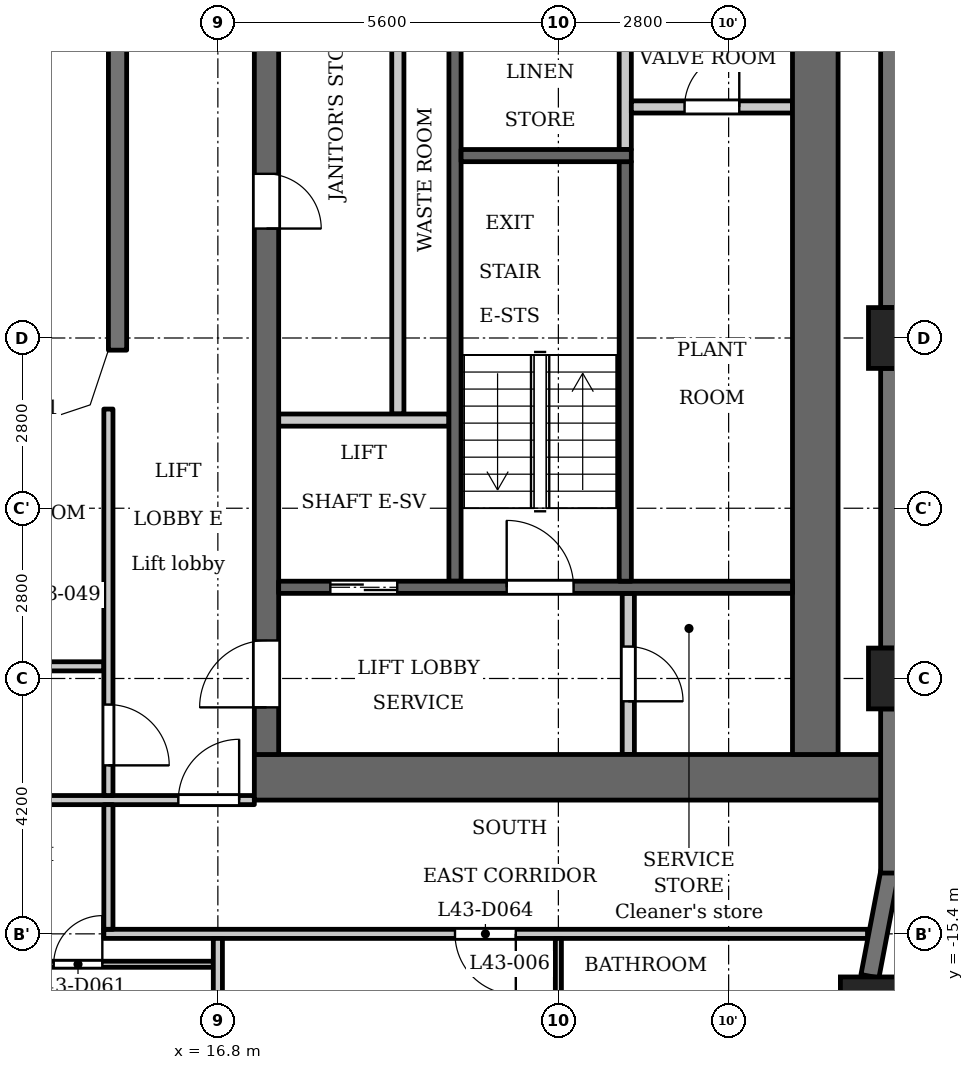
"""IFC4 building model, lengths in metres.
Left out: names, types, materials, properties, quantities, classifications, styles, units other than length and angle.
Written with IfcOpenShell. Run it as: python <this file> out.ifc"""

import sys

from ifc_helpers import new_model, si_unit, direction, frame, frame_2d, origin, origin_2d, place, context, subcontext, project, spatial, polyline, rectangle, outline, extrude, element, fill, save


model = new_model("IFC4")
c1 = context("Model", 3, precision=1e-05, world=origin(), true_north=direction((0.0, 1.0)))
c2 = subcontext(c1, "Body", "Model", "MODEL_VIEW")
j1 = project(units=[si_unit("LENGTHUNIT", "METRE"), si_unit("PLANEANGLEUNIT", "RADIAN")], contexts=[c1])
p1 = place(None, origin())
s1 = spatial("IfcSite", under=j1, at=p1, CompositionType="ELEMENT")
p2 = place(p1, origin())
s2 = spatial("IfcBuilding", under=s1, at=p2, CompositionType="ELEMENT")
p3 = place(p2, frame((0.0, 0.0, 167.6)))
s3 = spatial("IfcBuildingStorey", under=s2, at=p3, CompositionType="ELEMENT", Elevation=167.6)
for number, where, z_axis, x_axis in (
    (1, (27.538, -16.609, 0.0), (0.0, 0.0, 1.0), (1.0, 0.0, 0.0)),
    (2, (28.0, -11.2, 0.0), (0.0, 0.0, 1.0), (1.0, 0.0, 0.0)),
    (3, (28.0, -5.6, 0.0), (0.0, 0.0, 1.0), (1.0, 0.0, 0.0)),
):
    element("IfcColumn", number, at=place(p3, frame(where, z_axis=z_axis, x_axis=x_axis)), inside=s3, PredefinedType="COLUMN", context=c2, shape_type="SweptSolid", body=[
        extrude(rectangle(XDim=1.0, YDim=1.0, at=origin_2d()), origin(), (0.0, 0.0, 1.0), 3.5),
    ])
p4 = place(p3, frame((27.524, -16.097, 0.0), z_axis=(0.0, 0.0, 1.0), x_axis=(0.187259034321, 0.982310569049, 0.0)))
e4 = element("IfcWall", 4, at=p4, inside=s3, PredefinedType="SOLIDWALL", context=c2, shape_type="SweptSolid", body=[
    extrude(rectangle(XDim=1.756, YDim=0.3, at=frame_2d((0.878, 0.0))), origin(), (0.0, 0.0, 1.0), 2.45),
])
p5 = place(p3, frame((27.85, -14.4, 0.0), z_axis=(0.0, 0.0, 1.0), x_axis=(0.0, 1.0, 0.0)))
e5 = element("IfcWall", 5, at=p5, inside=s3, PredefinedType="SOLIDWALL", context=c2, shape_type="SweptSolid", body=[
    extrude(rectangle(XDim=2.7, YDim=0.3, at=frame_2d((1.35, 0.0))), origin(), (0.0, 0.0, 1.0), 2.45),
])
p6 = place(p3, frame((27.85, -10.7, 0.0), z_axis=(0.0, 0.0, 1.0), x_axis=(0.0, 1.0, 0.0)))
e6 = element("IfcWall", 6, at=p6, inside=s3, PredefinedType="SOLIDWALL", context=c2, shape_type="SweptSolid", body=[
    extrude(rectangle(XDim=4.6, YDim=0.3, at=frame_2d((2.3, 0.0))), origin(), (0.0, 0.0, 1.0), 2.45),
])
p7 = place(p3, frame((27.85, -5.1, 0.0), z_axis=(0.0, 0.0, 1.0), x_axis=(0.0, 1.0, 0.0)))
e7 = element("IfcWall", 7, at=p7, inside=s3, PredefinedType="SOLIDWALL", context=c2, shape_type="SweptSolid", body=[
    extrude(rectangle(XDim=4.6, YDim=0.3, at=frame_2d((2.3, 0.0))), origin(), (0.0, 0.0, 1.0), 2.45),
])
p8 = place(p3, frame((15.15, 5.8, 0.0), z_axis=(0.0, 0.0, 1.0), x_axis=(0.0, -1.0, 0.0)))
e8 = element("IfcWall", 8, at=p8, inside=s3, PredefinedType="SOLIDWALL", context=c2, shape_type="SweptSolid", body=[
    extrude(rectangle(XDim=11.6, YDim=0.3, at=frame_2d((5.8, 0.0))), origin(), (0.0, 0.0, 1.0), 3.2),
])
p9 = place(p3, frame((23.5, -2.5, 0.0), z_axis=(0.0, 0.0, 1.0), x_axis=(0.0, 1.0, 0.0)))
e9 = element("IfcWall", 9, at=p9, inside=s3, PredefinedType="PARTITIONING", context=c2, shape_type="SweptSolid", body=[
    extrude(rectangle(XDim=2.65, YDim=0.2, at=frame_2d((1.325, 0.0))), origin(), (0.0, 0.0, 1.0), 3.2),
])
p10 = place(p3, frame((20.7, -9.6, 0.0), z_axis=(0.0, 0.0, 1.0), x_axis=(0.0, 1.0, 0.0)))
e10 = element("IfcWall", 10, at=p10, inside=s3, PredefinedType="SHEAR", context=c2, shape_type="SweptSolid", body=[
    extrude(rectangle(XDim=9.75, YDim=0.2, at=frame_2d((4.875, 0.0))), origin(), (0.0, 0.0, 1.0), 3.2),
])
p11 = place(p3, frame((17.4, -12.825, 0.0), z_axis=(0.0, 0.0, 1.0), x_axis=(1.0, 0.0, 0.0)))
e11 = element("IfcWall", 11, at=p11, inside=s3, PredefinedType="SHEAR", context=c2, shape_type="SweptSolid", body=[
    extrude(rectangle(XDim=10.4, YDim=0.75, at=frame_2d((5.2, 0.0))), origin(), (0.0, 0.0, 1.0), 3.2),
])
p12 = place(p3, frame((19.76, -6.85, 0.0), z_axis=(0.0, 0.0, 1.0), x_axis=(0.0, 1.0, 0.0)))
e12 = element("IfcWall", 12, at=p12, inside=s3, PredefinedType="PARTITIONING", context=c2, shape_type="SweptSolid", body=[
    extrude(rectangle(XDim=7.0, YDim=0.2, at=frame_2d((3.5, 0.0))), origin(), (0.0, 0.0, 1.0), 3.2),
])
p13 = place(p3, frame((17.6, -12.45, 0.0), z_axis=(0.0, 0.0, 1.0), x_axis=(0.0, 1.0, 0.0)))
e13 = element("IfcWall", 13, at=p13, inside=s3, PredefinedType="SHEAR", context=c2, shape_type="SweptSolid", body=[
    extrude(rectangle(XDim=24.9, YDim=0.4, at=frame_2d((12.45, 0.0))), origin(), (0.0, 0.0, 1.0), 3.2),
])
p14 = place(p13, frame((8.65, 0.0, 0.0)))
e14 = element("IfcOpeningElement", 14, at=p14, cuts=e13, PredefinedType="OPENING", context=c2, shape_type="SweptSolid", body=[
    extrude(rectangle(XDim=0.9, YDim=2.1, at=frame_2d((0.45, 1.05))), frame((0.0, 0.21, 0.0), z_axis=(0.0, -1.0, 0.0), x_axis=(1.0, 0.0, 0.0)), (0.0, 0.0, 1.0), 0.42),
])
p15 = place(p13, frame((15.6, 0.0, 0.0)))
e15 = element("IfcOpeningElement", 15, at=p15, cuts=e13, PredefinedType="OPENING", context=c2, shape_type="SweptSolid", body=[
    extrude(rectangle(XDim=1.1, YDim=2.1, at=frame_2d((0.55, 1.05))), frame((0.0, 0.21, 0.0), z_axis=(0.0, -1.0, 0.0), x_axis=(1.0, 0.0, 0.0)), (0.0, 0.0, 1.0), 0.42),
])
p16 = place(p13, frame((18.0, 0.0, 0.0)))
e16 = element("IfcOpeningElement", 16, at=p16, cuts=e13, PredefinedType="OPENING", context=c2, shape_type="SweptSolid", body=[
    extrude(rectangle(XDim=1.1, YDim=2.1, at=frame_2d((0.55, 1.05))), frame((0.0, 0.21, 0.0), z_axis=(0.0, -1.0, 0.0), x_axis=(1.0, 0.0, 0.0)), (0.0, 0.0, 1.0), 0.42),
])
p17 = place(p13, frame((23.025, 0.0, 0.0)))
e17 = element("IfcOpeningElement", 17, at=p17, cuts=e13, PredefinedType="OPENING", context=c2, shape_type="SweptSolid", body=[
    extrude(rectangle(XDim=1.1, YDim=2.1, at=frame_2d((0.55, 1.05))), frame((0.0, 0.21, 0.0), z_axis=(0.0, -1.0, 0.0), x_axis=(1.0, 0.0, 0.0)), (0.0, 0.0, 1.0), 0.42),
])
p18 = place(p13, frame((0.775, 0.0, 0.0)))
e18 = element("IfcOpeningElement", 18, at=p18, cuts=e13, PredefinedType="OPENING", context=c2, shape_type="SweptSolid", body=[
    extrude(rectangle(XDim=1.1, YDim=2.1, at=frame_2d((0.55, 1.05))), frame((0.0, 0.21, 0.0), z_axis=(0.0, -1.0, 0.0), x_axis=(1.0, 0.0, 0.0)), (0.0, 0.0, 1.0), 0.42),
])
p19 = place(p13, frame((12.925, 0.0, 0.0)))
e19 = element("IfcOpeningElement", 19, at=p19, cuts=e13, PredefinedType="OPENING", context=c2, shape_type="SweptSolid", body=[
    extrude(rectangle(XDim=1.8, YDim=2.1, at=frame_2d((0.9, 1.05))), frame((0.0, 0.21, 0.0), z_axis=(0.0, -1.0, 0.0), x_axis=(1.0, 0.0, 0.0)), (0.0, 0.0, 1.0), 0.42),
])
p20 = place(p3, frame((26.625, -12.45, 0.0), z_axis=(0.0, 0.0, 1.0), x_axis=(0.0, 1.0, 0.0)))
e20 = element("IfcWall", 20, at=p20, inside=s3, PredefinedType="SHEAR", context=c2, shape_type="SweptSolid", body=[
    extrude(rectangle(XDim=24.9, YDim=0.75, at=frame_2d((12.45, 0.0))), origin(), (0.0, 0.0, 1.0), 3.2),
])
p21 = place(p3, frame((23.55, -12.45, 0.0), z_axis=(0.0, 0.0, 1.0), x_axis=(0.0, 1.0, 0.0)))
e21 = element("IfcWall", 21, at=p21, inside=s3, PredefinedType="PARTITIONING", context=c2, shape_type="SweptSolid", body=[
    extrude(rectangle(XDim=2.65, YDim=0.2, at=frame_2d((1.325, 0.0))), origin(), (0.0, 0.0, 1.0), 3.2),
])
p22 = place(p21, frame((0.875, 0.0, 0.0)))
e22 = element("IfcOpeningElement", 22, at=p22, cuts=e21, PredefinedType="OPENING", context=c2, shape_type="SweptSolid", body=[
    extrude(rectangle(XDim=0.9, YDim=2.1, at=frame_2d((0.45, 1.05))), frame((0.0, 0.11, 0.0), z_axis=(0.0, -1.0, 0.0), x_axis=(1.0, 0.0, 0.0)), (0.0, 0.0, 1.0), 0.22),
])
p23 = place(p3, frame((23.6, -1.8, 0.0), z_axis=(0.0, 0.0, 1.0), x_axis=(1.0, 0.0, 0.0)))
e23 = element("IfcWall", 23, at=p23, inside=s3, PredefinedType="PARTITIONING", context=c2, shape_type="SweptSolid", body=[
    extrude(rectangle(XDim=2.65, YDim=0.2, at=frame_2d((1.325, 0.0))), origin(), (0.0, 0.0, 1.0), 3.2),
])
p24 = place(p23, frame((0.875, 0.0, 0.0)))
e24 = element("IfcOpeningElement", 24, at=p24, cuts=e23, PredefinedType="OPENING", context=c2, shape_type="SweptSolid", body=[
    extrude(rectangle(XDim=0.9, YDim=2.1, at=frame_2d((0.45, 1.05))), frame((0.0, 0.11, 0.0), z_axis=(0.0, -1.0, 0.0), x_axis=(1.0, 0.0, 0.0)), (0.0, 0.0, 1.0), 0.22),
])
p25 = place(p3, frame((17.8, -9.7, 0.0), z_axis=(0.0, 0.0, 1.0), x_axis=(1.0, 0.0, 0.0)))
e25 = element("IfcWall", 25, at=p25, inside=s3, PredefinedType="SHEAR", context=c2, shape_type="SweptSolid", body=[
    extrude(rectangle(XDim=8.45, YDim=0.2, at=frame_2d((4.225, 0.0))), origin(), (0.0, 0.0, 1.0), 3.2),
])
p26 = place(p25, frame((0.85, 0.0, 0.0)))
e26 = element("IfcOpeningElement", 26, at=p26, cuts=e25, PredefinedType="OPENING", context=c2, shape_type="SweptSolid", body=[
    extrude(rectangle(XDim=1.1, YDim=2.1, at=frame_2d((0.55, 1.05))), frame((0.0, 0.11, 0.0), z_axis=(0.0, -1.0, 0.0), x_axis=(1.0, 0.0, 0.0)), (0.0, 0.0, 1.0), 0.22),
])
p27 = place(p25, frame((3.75, 0.0, 0.0)))
e27 = element("IfcOpeningElement", 27, at=p27, cuts=e25, PredefinedType="OPENING", context=c2, shape_type="SweptSolid", body=[
    extrude(rectangle(XDim=1.1, YDim=2.1, at=frame_2d((0.55, 1.05))), frame((0.0, 0.11, 0.0), z_axis=(0.0, -1.0, 0.0), x_axis=(1.0, 0.0, 0.0)), (0.0, 0.0, 1.0), 0.22),
])
p28 = place(p3, frame((17.8, -6.95, 0.0), z_axis=(0.0, 0.0, 1.0), x_axis=(1.0, 0.0, 0.0)))
e28 = element("IfcWall", 28, at=p28, inside=s3, PredefinedType="PARTITIONING", context=c2, shape_type="SweptSolid", body=[
    extrude(rectangle(XDim=2.8, YDim=0.2, at=frame_2d((1.4, 0.0))), origin(), (0.0, 0.0, 1.0), 3.2),
])
p29 = place(p3, frame((23.5, -9.6, 0.0), z_axis=(0.0, 0.0, 1.0), x_axis=(0.0, 1.0, 0.0)))
e29 = element("IfcWall", 29, at=p29, inside=s3, PredefinedType="SHEAR", context=c2, shape_type="SweptSolid", body=[
    extrude(rectangle(XDim=6.9, YDim=0.2, at=frame_2d((3.45, 0.0))), origin(), (0.0, 0.0, 1.0), 3.2),
])
p30 = place(p3, frame((20.8, -2.6, 0.0), z_axis=(0.0, 0.0, 1.0), x_axis=(1.0, 0.0, 0.0)))
e30 = element("IfcWall", 30, at=p30, inside=s3, PredefinedType="SHEAR", context=c2, shape_type="SweptSolid", body=[
    extrude(rectangle(XDim=2.8, YDim=0.2, at=frame_2d((1.4, 0.0))), origin(), (0.0, 0.0, 1.0), 3.2),
])
p31 = place(p3, frame((-16.725, -15.9, 0.0), z_axis=(0.0, 0.0, 1.0), x_axis=(1.0, 0.0, 0.0)))
e31 = element("IfcWall", 31, at=p31, inside=s3, PredefinedType="PARTITIONING", context=c2, shape_type="SweptSolid", body=[
    extrude(rectangle(XDim=33.45, YDim=0.1, at=frame_2d((16.725, 0.0))), origin(), (0.0, 0.0, 1.0), 3.2),
])
p32 = place(p31, frame((9.675, 0.0, 0.0)))
e32 = element("IfcOpeningElement", 32, at=p32, cuts=e31, PredefinedType="OPENING", context=c2, shape_type="SweptSolid", body=[
    extrude(rectangle(XDim=0.8, YDim=2.1, at=frame_2d((0.4, 1.05))), frame((0.0, 0.06, 0.0), z_axis=(0.0, -1.0, 0.0), x_axis=(1.0, 0.0, 0.0)), (0.0, 0.0, 1.0), 0.12),
])
p33 = place(p31, frame((4.075, 0.0, 0.0)))
e33 = element("IfcOpeningElement", 33, at=p33, cuts=e31, PredefinedType="OPENING", context=c2, shape_type="SweptSolid", body=[
    extrude(rectangle(XDim=0.9, YDim=2.1, at=frame_2d((0.45, 1.05))), frame((0.0, 0.06, 0.0), z_axis=(0.0, -1.0, 0.0), x_axis=(1.0, 0.0, 0.0)), (0.0, 0.0, 1.0), 0.12),
])
p34 = place(p31, frame((20.875, 0.0, 0.0)))
e34 = element("IfcOpeningElement", 34, at=p34, cuts=e31, PredefinedType="OPENING", context=c2, shape_type="SweptSolid", body=[
    extrude(rectangle(XDim=0.8, YDim=2.1, at=frame_2d((0.4, 1.05))), frame((0.0, 0.06, 0.0), z_axis=(0.0, -1.0, 0.0), x_axis=(1.0, 0.0, 0.0)), (0.0, 0.0, 1.0), 0.12),
])
p35 = place(p31, frame((15.275, 0.0, 0.0)))
e35 = element("IfcOpeningElement", 35, at=p35, cuts=e31, PredefinedType="OPENING", context=c2, shape_type="SweptSolid", body=[
    extrude(rectangle(XDim=0.9, YDim=2.1, at=frame_2d((0.45, 1.05))), frame((0.0, 0.06, 0.0), z_axis=(0.0, -1.0, 0.0), x_axis=(1.0, 0.0, 0.0)), (0.0, 0.0, 1.0), 0.12),
])
p36 = place(p31, frame((30.825, 0.0, 0.0)))
e36 = element("IfcOpeningElement", 36, at=p36, cuts=e31, PredefinedType="OPENING", context=c2, shape_type="SweptSolid", body=[
    extrude(rectangle(XDim=0.8, YDim=2.1, at=frame_2d((0.4, 1.05))), frame((0.0, 0.06, 0.0), z_axis=(0.0, -1.0, 0.0), x_axis=(1.0, 0.0, 0.0)), (0.0, 0.0, 1.0), 0.12),
])
p37 = place(p31, frame((26.475, 0.0, 0.0)))
e37 = element("IfcOpeningElement", 37, at=p37, cuts=e31, PredefinedType="OPENING", context=c2, shape_type="SweptSolid", body=[
    extrude(rectangle(XDim=0.9, YDim=2.1, at=frame_2d((0.45, 1.05))), frame((0.0, 0.06, 0.0), z_axis=(0.0, -1.0, 0.0), x_axis=(1.0, 0.0, 0.0)), (0.0, 0.0, 1.0), 0.12),
])
p38 = place(p3, frame((14.925, -15.4, 0.0), z_axis=(0.0, 0.0, 1.0), x_axis=(1.0, 0.0, 0.0)))
e38 = element("IfcWall", 38, at=p38, inside=s3, PredefinedType="PARTITIONING", context=c2, shape_type="SweptSolid", body=[
    extrude(rectangle(XDim=12.559, YDim=0.15, at=frame_2d((6.279, 0.0))), origin(), (0.0, 0.0, 1.0), 3.2),
])
p39 = place(p38, frame((5.775, 0.0, 0.0)))
e39 = element("IfcOpeningElement", 39, at=p39, cuts=e38, PredefinedType="OPENING", context=c2, shape_type="SweptSolid", body=[
    extrude(rectangle(XDim=1.0, YDim=2.1, at=frame_2d((0.5, 1.05))), frame((0.0, 0.085, 0.0), z_axis=(0.0, -1.0, 0.0), x_axis=(1.0, 0.0, 0.0)), (0.0, 0.0, 1.0), 0.17),
])
p40 = place(p3, frame((-17.4, -13.2, 0.0), z_axis=(0.0, 0.0, 1.0), x_axis=(1.0, 0.0, 0.0)))
e40 = element("IfcWall", 40, at=p40, inside=s3, PredefinedType="PARTITIONING", context=c2, shape_type="SweptSolid", body=[
    extrude(rectangle(XDim=34.8, YDim=0.15, at=frame_2d((17.4, 0.0))), origin(), (0.0, 0.0, 1.0), 3.2),
])
p41 = place(p40, frame((0.15, 0.0, 0.0)))
e41 = element("IfcOpeningElement", 41, at=p41, cuts=e40, PredefinedType="OPENING", context=c2, shape_type="SweptSolid", body=[
    extrude(rectangle(XDim=1.0, YDim=2.1, at=frame_2d((0.5, 1.05))), frame((0.0, 0.085, 0.0), z_axis=(0.0, -1.0, 0.0), x_axis=(1.0, 0.0, 0.0)), (0.0, 0.0, 1.0), 0.17),
])
p42 = place(p40, frame((33.55, 0.0, 0.0)))
e42 = element("IfcOpeningElement", 42, at=p42, cuts=e40, PredefinedType="OPENING", context=c2, shape_type="SweptSolid", body=[
    extrude(rectangle(XDim=1.0, YDim=2.1, at=frame_2d((0.5, 1.05))), frame((0.0, 0.085, 0.0), z_axis=(0.0, -1.0, 0.0), x_axis=(1.0, 0.0, 0.0)), (0.0, 0.0, 1.0), 0.17),
])
p43 = place(p40, frame((15.7, 0.0, 0.0)))
e43 = element("IfcOpeningElement", 43, at=p43, cuts=e40, PredefinedType="OPENING", context=c2, shape_type="SweptSolid", body=[
    extrude(rectangle(XDim=1.0, YDim=2.1, at=frame_2d((0.5, 1.05))), frame((0.0, 0.085, 0.0), z_axis=(0.0, -1.0, 0.0), x_axis=(1.0, 0.0, 0.0)), (0.0, 0.0, 1.0), 0.17),
])
p44 = place(p40, frame((26.9, 0.0, 0.0)))
e44 = element("IfcOpeningElement", 44, at=p44, cuts=e40, PredefinedType="OPENING", context=c2, shape_type="SweptSolid", body=[
    extrude(rectangle(XDim=1.0, YDim=2.1, at=frame_2d((0.5, 1.05))), frame((0.0, 0.085, 0.0), z_axis=(0.0, -1.0, 0.0), x_axis=(1.0, 0.0, 0.0)), (0.0, 0.0, 1.0), 0.17),
])
p45 = place(p3, frame((-14.925, -11.0, 0.0), z_axis=(0.0, 0.0, 1.0), x_axis=(1.0, 0.0, 0.0)))
e45 = element("IfcWall", 45, at=p45, inside=s3, PredefinedType="PARTITIONING", context=c2, shape_type="SweptSolid", body=[
    extrude(rectangle(XDim=29.85, YDim=0.15, at=frame_2d((14.925, 0.0))), origin(), (0.0, 0.0, 1.0), 3.2),
])
p46 = place(p45, frame((9.875, 0.0, 0.0)))
e46 = element("IfcOpeningElement", 46, at=p46, cuts=e45, PredefinedType="OPENING", context=c2, shape_type="SweptSolid", body=[
    extrude(rectangle(XDim=1.0, YDim=2.1, at=frame_2d((0.5, 1.05))), frame((0.0, 0.085, 0.0), z_axis=(0.0, -1.0, 0.0), x_axis=(1.0, 0.0, 0.0)), (0.0, 0.0, 1.0), 0.17),
])
p47 = place(p45, frame((17.875, 0.0, 0.0)))
e47 = element("IfcOpeningElement", 47, at=p47, cuts=e45, PredefinedType="OPENING", context=c2, shape_type="SweptSolid", body=[
    extrude(rectangle(XDim=1.0, YDim=2.1, at=frame_2d((0.5, 1.05))), frame((0.0, 0.085, 0.0), z_axis=(0.0, -1.0, 0.0), x_axis=(1.0, 0.0, 0.0)), (0.0, 0.0, 1.0), 0.17),
])
p48 = place(p3, frame((15.0, -15.325, 0.0), z_axis=(0.0, 0.0, 1.0), x_axis=(0.0, 1.0, 0.0)))
e48 = element("IfcWall", 48, at=p48, inside=s3, PredefinedType="PARTITIONING", context=c2, shape_type="SweptSolid", body=[
    extrude(rectangle(XDim=2.05, YDim=0.15, at=frame_2d((1.025, 0.0))), origin(), (0.0, 0.0, 1.0), 3.2),
])
p49 = place(p3, frame((15.0, -13.125, 0.0), z_axis=(0.0, 0.0, 1.0), x_axis=(0.0, 1.0, 0.0)))
e49 = element("IfcWall", 49, at=p49, inside=s3, PredefinedType="PARTITIONING", context=c2, shape_type="SweptSolid", body=[
    extrude(rectangle(XDim=6.356, YDim=0.15, at=frame_2d((3.178, 0.0))), origin(), (0.0, 0.0, 1.0), 3.2),
])
p50 = place(p49, frame((0.496, 0.0, 0.0)))
e50 = element("IfcOpeningElement", 50, at=p50, cuts=e49, PredefinedType="OPENING", context=c2, shape_type="SweptSolid", body=[
    extrude(rectangle(XDim=1.0, YDim=2.1, at=frame_2d((0.5, 1.05))), frame((0.0, 0.085, 0.0), z_axis=(0.0, -1.0, 0.0), x_axis=(1.0, 0.0, 0.0)), (0.0, 0.0, 1.0), 0.17),
])
p51 = place(p3, frame((16.8, -22.88, 0.0), z_axis=(0.0, 0.0, 1.0), x_axis=(0.0, 1.0, 0.0)))
e51 = element("IfcWall", 51, at=p51, inside=s3, PredefinedType="PARTITIONING", context=c2, shape_type="SweptSolid", body=[
    extrude(rectangle(XDim=7.405, YDim=0.15, at=frame_2d((3.702, 0.0))), origin(), (0.0, 0.0, 1.0), 3.2),
])
p52 = place(p3, frame((22.4, -18.05, 0.0), z_axis=(0.0, 0.0, 1.0), x_axis=(0.0, 1.0, 0.0)))
e52 = element("IfcWall", 52, at=p52, inside=s3, PredefinedType="PARTITIONING", context=c2, shape_type="SweptSolid", body=[
    extrude(rectangle(XDim=2.575, YDim=0.1, at=frame_2d((1.288, 0.0))), origin(), (0.0, 0.0, 1.0), 3.2),
])
p53 = place(p3, origin())
e53 = element("IfcWall", 53, at=p53, inside=s3, PredefinedType="SOLIDWALL", context=c2, shape_type="SweptSolid", body=[
    extrude(outline(polyline([(14.937, -6.937), (15.3, -5.849), (15.3, -5.8), (15.0, -5.8), (14.7, -6.7), (13.8, -7.0), (13.8, -7.3), (13.849, -7.3), (14.937, -6.937)])), origin(), (0.0, 0.0, 1.0), 3.2),
])
p54 = place(p26, origin())
e54 = element("IfcDoor", 54, at=p54, inside=s3, OperationType="DOUBLE_DOOR_SLIDING", PredefinedType="DOOR", context=c2, shape_type="SweptSolid", body=[
    extrude(rectangle(XDim=1.1, YDim=2.1, at=frame_2d((0.55, 1.05))), frame((0.0, 0.025, 0.0), z_axis=(0.0, -1.0, 0.0), x_axis=(1.0, 0.0, 0.0)), (0.0, 0.0, 1.0), 0.05),
])
fill(e26, e54)
p55 = place(p14, origin())
e55 = element("IfcDoor", 55, at=p55, inside=s3, OperationType="SINGLE_SWING_LEFT", PredefinedType="DOOR", context=c2, shape_type="SweptSolid", body=[
    extrude(rectangle(XDim=0.9, YDim=2.1, at=frame_2d((0.45, 1.05))), frame((0.0, 0.025, 0.0), z_axis=(0.0, -1.0, 0.0), x_axis=(1.0, 0.0, 0.0)), (0.0, 0.0, 1.0), 0.05),
])
fill(e14, e55)
p56 = place(p18, origin())
e56 = element("IfcDoor", 56, at=p56, inside=s3, OperationType="SINGLE_SWING_RIGHT", PredefinedType="DOOR", context=c2, shape_type="SweptSolid", body=[
    extrude(rectangle(XDim=1.1, YDim=2.1, at=frame_2d((0.55, 1.05))), frame((0.0, 0.025, 0.0), z_axis=(0.0, -1.0, 0.0), x_axis=(1.0, 0.0, 0.0)), (0.0, 0.0, 1.0), 0.05),
])
fill(e18, e56)
p57 = place(p22, origin())
e57 = element("IfcDoor", 57, at=p57, inside=s3, OperationType="SINGLE_SWING_LEFT", PredefinedType="DOOR", context=c2, shape_type="SweptSolid", body=[
    extrude(rectangle(XDim=0.9, YDim=2.1, at=frame_2d((0.45, 1.05))), frame((0.0, 0.025, 0.0), z_axis=(0.0, -1.0, 0.0), x_axis=(1.0, 0.0, 0.0)), (0.0, 0.0, 1.0), 0.05),
])
fill(e22, e57)
p58 = place(p27, origin())
e58 = element("IfcDoor", 58, at=p58, inside=s3, OperationType="SINGLE_SWING_RIGHT", PredefinedType="DOOR", context=c2, shape_type="SweptSolid", body=[
    extrude(rectangle(XDim=1.1, YDim=2.1, at=frame_2d((0.55, 1.05))), frame((0.0, 0.025, 0.0), z_axis=(0.0, -1.0, 0.0), x_axis=(1.0, 0.0, 0.0)), (0.0, 0.0, 1.0), 0.05),
])
fill(e27, e58)
p59 = place(p24, origin())
e59 = element("IfcDoor", 59, at=p59, inside=s3, OperationType="SINGLE_SWING_LEFT", PredefinedType="DOOR", context=c2, shape_type="SweptSolid", body=[
    extrude(rectangle(XDim=0.9, YDim=2.1, at=frame_2d((0.45, 1.05))), frame((0.0, 0.025, 0.0), z_axis=(0.0, -1.0, 0.0), x_axis=(1.0, 0.0, 0.0)), (0.0, 0.0, 1.0), 0.05),
])
fill(e24, e59)
p60 = place(p50, origin())
e60 = element("IfcDoor", 60, at=p60, inside=s3, OperationType="SINGLE_SWING_LEFT", PredefinedType="DOOR", context=c2, shape_type="SweptSolid", body=[
    extrude(rectangle(XDim=1.0, YDim=2.1, at=frame_2d((0.5, 1.05))), frame((0.0, 0.025, 0.0), z_axis=(0.0, -1.0, 0.0), x_axis=(1.0, 0.0, 0.0)), (0.0, 0.0, 1.0), 0.05),
])
fill(e50, e60)
p61 = place(p42, origin())
e61 = element("IfcDoor", 61, at=p61, inside=s3, OperationType="SINGLE_SWING_LEFT", PredefinedType="DOOR", context=c2, shape_type="SweptSolid", body=[
    extrude(rectangle(XDim=1.0, YDim=2.1, at=frame_2d((0.5, 1.05))), frame((0.0, 0.025, 0.0), z_axis=(0.0, -1.0, 0.0), x_axis=(1.0, 0.0, 0.0)), (0.0, 0.0, 1.0), 0.05),
])
fill(e42, e61)
p62 = place(p36, origin())
e62 = element("IfcDoor", 62, at=p62, inside=s3, OperationType="SINGLE_SWING_LEFT", PredefinedType="DOOR", context=c2, shape_type="SweptSolid", body=[
    extrude(rectangle(XDim=0.8, YDim=2.1, at=frame_2d((0.4, 1.05))), frame((0.0, 0.025, 0.0), z_axis=(0.0, -1.0, 0.0), x_axis=(1.0, 0.0, 0.0)), (0.0, 0.0, 1.0), 0.05),
])
fill(e36, e62)
p63 = place(p39, origin())
e63 = element("IfcDoor", 63, at=p63, inside=s3, OperationType="SINGLE_SWING_RIGHT", PredefinedType="DOOR", context=c2, shape_type="SweptSolid", body=[
    extrude(rectangle(XDim=1.0, YDim=2.1, at=frame_2d((0.5, 1.05))), frame((0.0, 0.025, 0.0), z_axis=(0.0, -1.0, 0.0), x_axis=(1.0, 0.0, 0.0)), (0.0, 0.0, 1.0), 0.05),
])
fill(e39, e63)
save(model, sys.argv[1])
